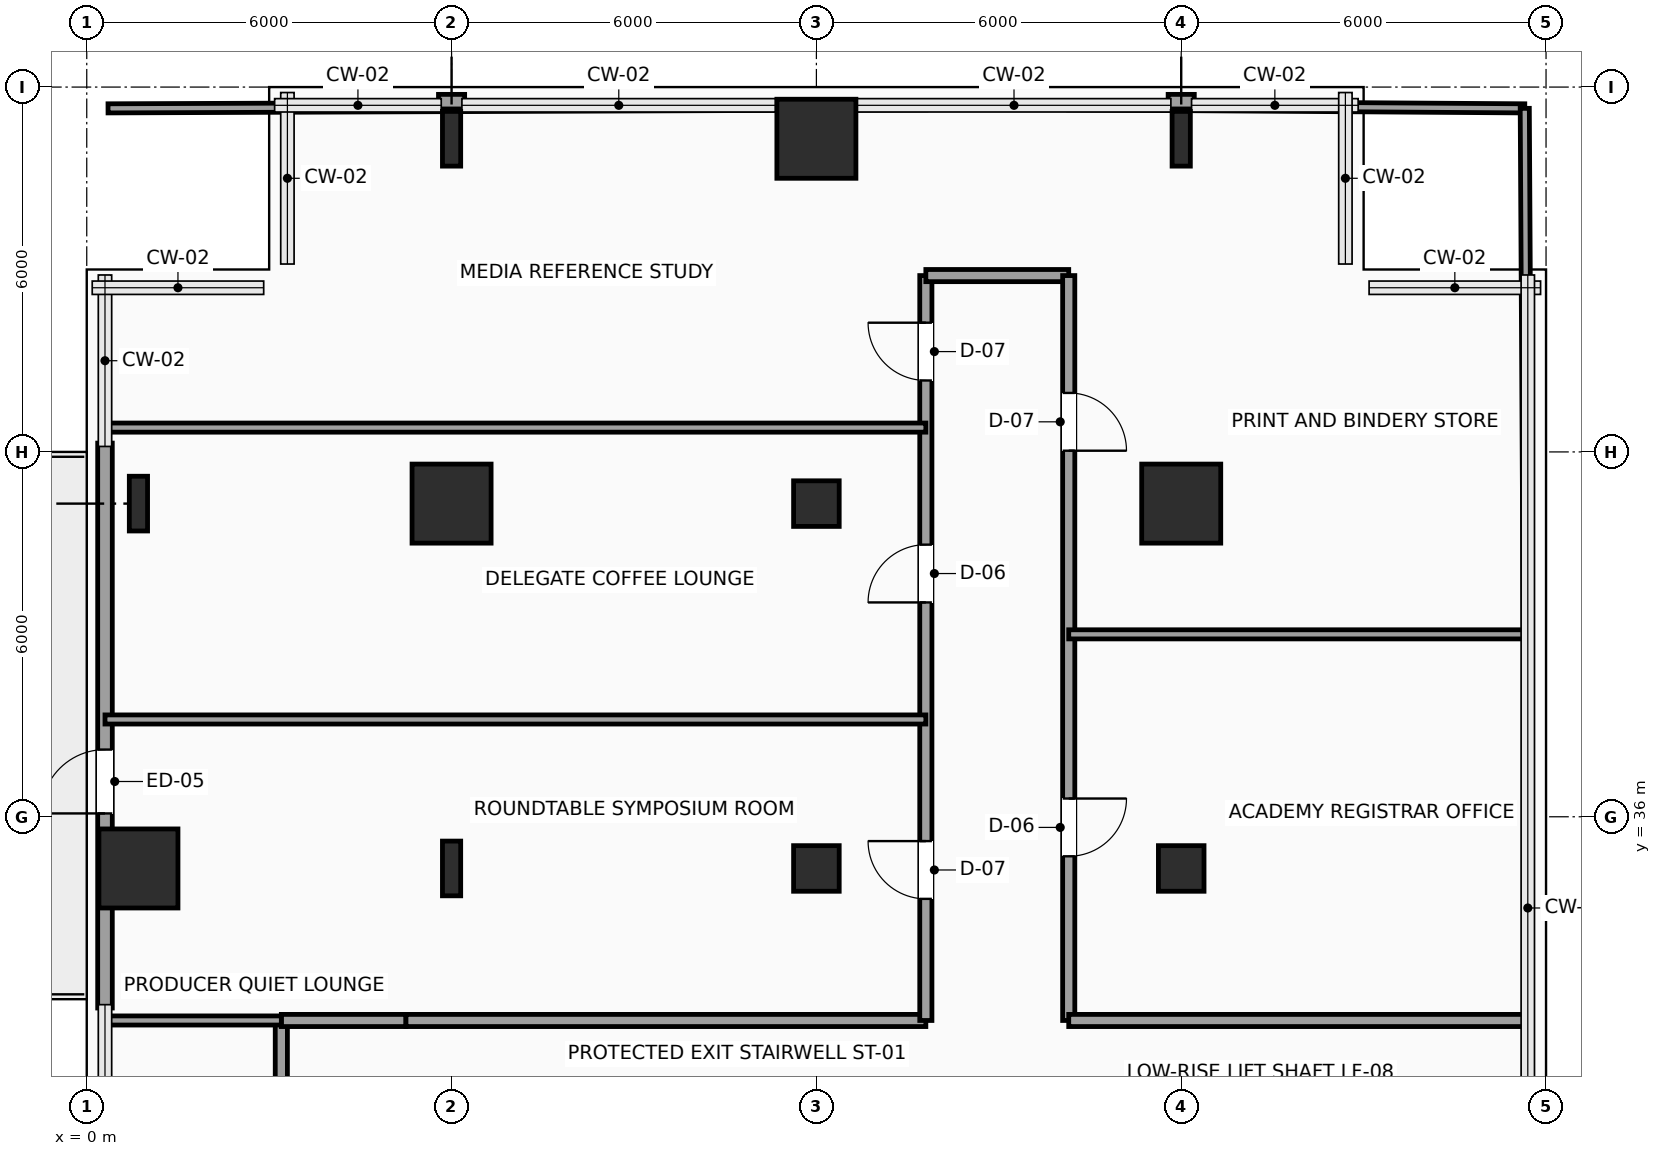
"""IFC4 building model, lengths in metres.
Left out: names, types, materials, properties, quantities, classifications, styles, units other than length and angle.
Written with IfcOpenShell. Run it as: python <this file> out.ifc"""

import sys

from ifc_helpers import new_model, si_unit, direction, frame, frame_2d, origin, origin_2d, place, context, subcontext, project, spatial, rectangle, hollow_rectangle, i_section, extrude, element, fill, save


model = new_model("IFC4")
c1 = context("Model", 3, precision=1e-05, world=origin(), true_north=direction((0.0, 1.0)))
c2 = subcontext(c1, "Body", "Model", "MODEL_VIEW")
j1 = project(units=[si_unit("LENGTHUNIT", "METRE"), si_unit("PLANEANGLEUNIT", "RADIAN")], contexts=[c1])
p1 = place(None, origin())
s1 = spatial("IfcSite", under=j1, at=p1, CompositionType="ELEMENT")
p2 = place(p1, origin())
s2 = spatial("IfcBuilding", under=s1, at=p2, CompositionType="ELEMENT")
p3 = place(p2, frame((0.0, 0.0, 55.8)))
s3 = spatial("IfcBuildingStorey", under=s2, at=p3, CompositionType="ELEMENT", Elevation=55.8)
p4 = place(p3, frame((0.85, 35.15, 0.0), z_axis=(0.0, 0.0, 1.0), x_axis=(1.0, 0.0, 0.0)))
e1 = element("IfcColumn", 1, at=p4, inside=s3, PredefinedType="COLUMN", context=c2, shape_type="SweptSolid", body=[
    extrude(rectangle(XDim=1.3, YDim=1.3, at=origin_2d()), origin(), (0.0, 0.0, 1.0), 3.9),
])
for number, where, z_axis, x_axis in (
    (2, (0.85, 41.15, 0.0), (0.0, 0.0, 1.0), (1.0, 0.0, 0.0)),
    (3, (6.0, 35.15, 0.0), (0.0, 0.0, 1.0), (1.0, 0.0, 0.0)),
):
    element("IfcColumn", number, at=place(p3, frame(where, z_axis=z_axis, x_axis=x_axis)), inside=s3, PredefinedType="COLUMN", context=c2, shape_type="SweptSolid", body=[
        extrude(i_section(OverallWidth=0.3, OverallDepth=0.9, WebThickness=0.019, FlangeThickness=0.035, FilletRadius=0.03, at=origin_2d()), origin(), (0.0, 0.0, 1.0), 3.9),
    ])
p5 = place(p3, frame((6.0, 41.15, 0.0), z_axis=(0.0, 0.0, 1.0), x_axis=(1.0, 0.0, 0.0)))
e4 = element("IfcColumn", 4, at=p5, inside=s3, PredefinedType="COLUMN", context=c2, shape_type="SweptSolid", body=[
    extrude(rectangle(XDim=1.3, YDim=1.3, at=origin_2d()), origin(), (0.0, 0.0, 1.0), 3.9),
])
p6 = place(p3, frame((6.0, 47.15, 0.0), z_axis=(0.0, 0.0, 1.0), x_axis=(1.0, 0.0, 0.0)))
e5 = element("IfcColumn", 5, at=p6, inside=s3, PredefinedType="COLUMN", context=c2, shape_type="SweptSolid", body=[
    extrude(i_section(OverallWidth=0.3, OverallDepth=0.9, WebThickness=0.019, FlangeThickness=0.035, FilletRadius=0.03, at=origin_2d()), origin(), (0.0, 0.0, 1.0), 3.9),
])
for number, where, z_axis, x_axis in (
    (6, (12.0, 35.15, 0.0), (0.0, 0.0, 1.0), (1.0, 0.0, 0.0)),
    (7, (12.0, 41.15, 0.0), (0.0, 0.0, 1.0), (1.0, 0.0, 0.0)),
):
    element("IfcColumn", number, at=place(p3, frame(where, z_axis=z_axis, x_axis=x_axis)), inside=s3, PredefinedType="COLUMN", context=c2, shape_type="SweptSolid", body=[
        extrude(hollow_rectangle(XDim=0.75, YDim=0.75, WallThickness=0.035, InnerFilletRadius=0.035, OuterFilletRadius=0.05, at=origin_2d()), origin(), (0.0, 0.0, 1.0), 3.9),
    ])
p7 = place(p3, frame((12.0, 47.15, 0.0), z_axis=(0.0, 0.0, 1.0), x_axis=(1.0, 0.0, 0.0)))
e8 = element("IfcColumn", 8, at=p7, inside=s3, PredefinedType="COLUMN", context=c2, shape_type="SweptSolid", body=[
    extrude(rectangle(XDim=1.3, YDim=1.3, at=origin_2d()), origin(), (0.0, 0.0, 1.0), 3.9),
])
p8 = place(p3, frame((18.0, 35.15, 0.0), z_axis=(0.0, 0.0, 1.0), x_axis=(1.0, 0.0, 0.0)))
e9 = element("IfcColumn", 9, at=p8, inside=s3, PredefinedType="COLUMN", context=c2, shape_type="SweptSolid", body=[
    extrude(hollow_rectangle(XDim=0.75, YDim=0.75, WallThickness=0.035, InnerFilletRadius=0.035, OuterFilletRadius=0.05, at=origin_2d()), origin(), (0.0, 0.0, 1.0), 3.9),
])
p9 = place(p3, frame((18.0, 41.15, 0.0), z_axis=(0.0, 0.0, 1.0), x_axis=(1.0, 0.0, 0.0)))
e10 = element("IfcColumn", 10, at=p9, inside=s3, PredefinedType="COLUMN", context=c2, shape_type="SweptSolid", body=[
    extrude(rectangle(XDim=1.3, YDim=1.3, at=origin_2d()), origin(), (0.0, 0.0, 1.0), 3.9),
])
p10 = place(p3, frame((18.0, 47.15, 0.0), z_axis=(0.0, 0.0, 1.0), x_axis=(1.0, 0.0, 0.0)))
e11 = element("IfcColumn", 11, at=p10, inside=s3, PredefinedType="COLUMN", context=c2, shape_type="SweptSolid", body=[
    extrude(i_section(OverallWidth=0.3, OverallDepth=0.9, WebThickness=0.019, FlangeThickness=0.035, FilletRadius=0.03, at=origin_2d()), origin(), (0.0, 0.0, 1.0), 3.9),
])
p11 = place(p3, frame((0.3, 32.855, 0.0), z_axis=(0.0, 0.0, 1.0), x_axis=(0.0, 1.0, 0.0)))
e12 = element("IfcWall", 12, at=p11, inside=s3, PredefinedType="SOLIDWALL", context=c2, shape_type="SweptSolid", body=[
    extrude(rectangle(XDim=9.29, YDim=0.24, at=frame_2d((4.645, 0.0))), origin(), (0.0, 0.0, 1.0), 3.65),
])
p12 = place(p11, frame((3.2, 0.0, 0.0)))
e13 = element("IfcOpeningElement", 13, at=p12, cuts=e12, PredefinedType="OPENING", context=c2, shape_type="SweptSolid", body=[
    extrude(rectangle(XDim=1.05, YDim=2.2, at=frame_2d((0.525, 1.1))), frame((0.0, 0.13, 0.0), z_axis=(0.0, -1.0, 0.0), x_axis=(1.0, 0.0, 0.0)), (0.0, 0.0, 1.0), 0.26),
])
for number, where, z_axis, x_axis in (
    (14, (5.785, 47.76, 0.0), (0.0, 0.0, 1.0), (1.0, 0.0, 0.0)),
    (15, (17.785, 47.76, 0.0), (0.0, 0.0, 1.0), (1.0, 0.0, 0.0)),
):
    element("IfcWall", number, at=place(p3, frame(where, z_axis=z_axis, x_axis=x_axis)), inside=s3, PredefinedType="SOLIDWALL", context=c2, shape_type="SweptSolid", body=[
        extrude(rectangle(XDim=0.43, YDim=0.24, at=frame_2d((0.215, 0.0))), origin(), (0.0, 0.0, 1.0), 3.65),
    ])
p13 = place(p3, frame((3.2, 30.25, 0.0), z_axis=(0.0, 0.0, 1.0), x_axis=(0.0, 1.0, 0.0)))
e16 = element("IfcWall", 16, at=p13, inside=s3, PredefinedType="SOLIDWALL", context=c2, shape_type="SweptSolid", body=[
    extrude(rectangle(XDim=2.4, YDim=0.2, at=frame_2d((1.2, 0.0))), origin(), (0.0, 0.0, 1.0), 3.65),
])
p14 = place(p3, frame((3.2, 32.65, 0.0), z_axis=(0.0, 0.0, 1.0), x_axis=(1.0, 0.0, 0.0)))
e17 = element("IfcWall", 17, at=p14, inside=s3, PredefinedType="SOLIDWALL", context=c2, shape_type="SweptSolid", body=[
    extrude(rectangle(XDim=2.05, YDim=0.2, at=frame_2d((1.025, 0.0))), origin(), (0.0, 0.0, 1.0), 3.65),
])
p15 = place(p3, frame((5.25, 32.65, 0.0), z_axis=(0.0, 0.0, 1.0), x_axis=(1.0, 0.0, 0.0)))
e18 = element("IfcWall", 18, at=p15, inside=s3, PredefinedType="SOLIDWALL", context=c2, shape_type="SweptSolid", body=[
    extrude(rectangle(XDim=8.55, YDim=0.2, at=frame_2d((4.275, 0.0))), origin(), (0.0, 0.0, 1.0), 3.65),
])
p16 = place(p3, frame((13.8, 32.65, 0.0), z_axis=(0.0, 0.0, 1.0), x_axis=(0.0, 1.0, 0.0)))
e19 = element("IfcWall", 19, at=p16, inside=s3, PredefinedType="SOLIDWALL", context=c2, shape_type="SweptSolid", body=[
    extrude(rectangle(XDim=12.25, YDim=0.2, at=frame_2d((6.125, 0.0))), origin(), (0.0, 0.0, 1.0), 3.65),
])
p17 = place(p16, frame((2.0, 0.0, 0.0)))
e20 = element("IfcOpeningElement", 20, at=p17, cuts=e19, PredefinedType="OPENING", context=c2, shape_type="SweptSolid", body=[
    extrude(rectangle(XDim=0.95, YDim=2.15, at=frame_2d((0.475, 1.075))), frame((0.0, 0.11, 0.0), z_axis=(0.0, -1.0, 0.0), x_axis=(1.0, 0.0, 0.0)), (0.0, 0.0, 1.0), 0.22),
])
p18 = place(p16, frame((6.875, 0.0, 0.0)))
e21 = element("IfcOpeningElement", 21, at=p18, cuts=e19, PredefinedType="OPENING", context=c2, shape_type="SweptSolid", body=[
    extrude(rectangle(XDim=0.95, YDim=2.15, at=frame_2d((0.475, 1.075))), frame((0.0, 0.11, 0.0), z_axis=(0.0, -1.0, 0.0), x_axis=(1.0, 0.0, 0.0)), (0.0, 0.0, 1.0), 0.22),
])
p19 = place(p16, frame((10.525, 0.0, 0.0)))
e22 = element("IfcOpeningElement", 22, at=p19, cuts=e19, PredefinedType="OPENING", context=c2, shape_type="SweptSolid", body=[
    extrude(rectangle(XDim=0.95, YDim=2.15, at=frame_2d((0.475, 1.075))), frame((0.0, 0.11, 0.0), z_axis=(0.0, -1.0, 0.0), x_axis=(1.0, 0.0, 0.0)), (0.0, 0.0, 1.0), 0.22),
])
p20 = place(p3, frame((13.8, 44.9, 0.0), z_axis=(0.0, 0.0, 1.0), x_axis=(1.0, 0.0, 0.0)))
e23 = element("IfcWall", 23, at=p20, inside=s3, PredefinedType="SOLIDWALL", context=c2, shape_type="SweptSolid", body=[
    extrude(rectangle(XDim=2.35, YDim=0.2, at=frame_2d((1.175, 0.0))), origin(), (0.0, 0.0, 1.0), 3.65),
])
p21 = place(p3, frame((16.15, 44.9, 0.0), z_axis=(0.0, 0.0, 1.0), x_axis=(0.0, -1.0, 0.0)))
e24 = element("IfcWall", 24, at=p21, inside=s3, PredefinedType="SOLIDWALL", context=c2, shape_type="SweptSolid", body=[
    extrude(rectangle(XDim=12.25, YDim=0.2, at=frame_2d((6.125, 0.0))), origin(), (0.0, 0.0, 1.0), 3.65),
])
p22 = place(p21, frame((8.6, 0.0, 0.0)))
e25 = element("IfcOpeningElement", 25, at=p22, cuts=e24, PredefinedType="OPENING", context=c2, shape_type="SweptSolid", body=[
    extrude(rectangle(XDim=0.95, YDim=2.15, at=frame_2d((0.475, 1.075))), frame((0.0, 0.11, 0.0), z_axis=(0.0, -1.0, 0.0), x_axis=(1.0, 0.0, 0.0)), (0.0, 0.0, 1.0), 0.22),
])
p23 = place(p21, frame((1.93, 0.0, 0.0)))
e26 = element("IfcOpeningElement", 26, at=p23, cuts=e24, PredefinedType="OPENING", context=c2, shape_type="SweptSolid", body=[
    extrude(rectangle(XDim=0.95, YDim=2.15, at=frame_2d((0.475, 1.075))), frame((0.0, 0.11, 0.0), z_axis=(0.0, -1.0, 0.0), x_axis=(1.0, 0.0, 0.0)), (0.0, 0.0, 1.0), 0.22),
])
p24 = place(p3, frame((16.15, 32.65, 0.0), z_axis=(0.0, 0.0, 1.0), x_axis=(1.0, 0.0, 0.0)))
e27 = element("IfcWall", 27, at=p24, inside=s3, PredefinedType="SOLIDWALL", context=c2, shape_type="SweptSolid", body=[
    extrude(rectangle(XDim=7.55, YDim=0.2, at=frame_2d((3.775, 0.0))), origin(), (0.0, 0.0, 1.0), 3.65),
])
for number, where, z_axis, x_axis in (
    (28, (0.3, 37.6, 0.0), (0.0, 0.0, 1.0), (1.0, 0.0, 0.0)),
    (29, (0.3, 42.4, 0.0), (0.0, 0.0, 1.0), (1.0, 0.0, 0.0)),
):
    element("IfcWall", number, at=place(p3, frame(where, z_axis=z_axis, x_axis=x_axis)), inside=s3, PredefinedType="PARTITIONING", context=c2, shape_type="SweptSolid", body=[
        extrude(rectangle(XDim=13.5, YDim=0.15, at=frame_2d((6.75, 0.0))), origin(), (0.0, 0.0, 1.0), 3.65),
    ])
p25 = place(p3, frame((0.35, 47.65, 0.0), z_axis=(0.0, 0.0, 1.0), x_axis=(0.99999304924, 0.003728467862, 0.0)))
e30 = element("IfcWall", 30, at=p25, inside=s3, PredefinedType="PARTITIONING", context=c2, shape_type="SweptSolid", body=[
    extrude(rectangle(XDim=5.435, YDim=0.15, at=frame_2d((2.717, 0.0))), origin(), (0.0, 0.0, 1.0), 3.65),
])
p26 = place(p3, frame((6.215, 47.672, 0.0), z_axis=(0.0, 0.0, 1.0), x_axis=(0.999993149305, 0.003701532515, 0.0)))
e31 = element("IfcWall", 31, at=p26, inside=s3, PredefinedType="PARTITIONING", context=c2, shape_type="SweptSolid", body=[
    extrude(rectangle(XDim=7.585, YDim=0.15, at=frame_2d((3.792, 0.0))), origin(), (0.0, 0.0, 1.0), 3.65),
])
p27 = place(p3, frame((16.15, 39.0, 0.0), z_axis=(0.0, 0.0, 1.0), x_axis=(1.0, 0.0, 0.0)))
e32 = element("IfcWall", 32, at=p27, inside=s3, PredefinedType="PARTITIONING", context=c2, shape_type="SweptSolid", body=[
    extrude(rectangle(XDim=7.55, YDim=0.15, at=frame_2d((3.775, 0.0))), origin(), (0.0, 0.0, 1.0), 3.65),
])
p28 = place(p3, frame((16.15, 47.7, 0.0), z_axis=(0.0, 0.0, 1.0), x_axis=(0.999978417552, -0.006569964219, 0.0)))
e33 = element("IfcWall", 33, at=p28, inside=s3, PredefinedType="PARTITIONING", context=c2, shape_type="SweptSolid", body=[
    extrude(rectangle(XDim=1.635, YDim=0.15, at=frame_2d((0.817, 0.0))), origin(), (0.0, 0.0, 1.0), 3.65),
])
p29 = place(p3, frame((18.215, 47.686, 0.0), z_axis=(0.0, 0.0, 1.0), x_axis=(0.999977600485, -0.006693170229, 0.0)))
e34 = element("IfcWall", 34, at=p29, inside=s3, PredefinedType="PARTITIONING", context=c2, shape_type="SweptSolid", body=[
    extrude(rectangle(XDim=5.435, YDim=0.15, at=frame_2d((2.717, 0.0))), origin(), (0.0, 0.0, 1.0), 3.65),
])
p30 = place(p3, frame((23.7, 39.0, 0.0), z_axis=(0.0, 0.0, 1.0), x_axis=(-0.005785960162, 0.999983261192, 0.0)))
e35 = element("IfcWall", 35, at=p30, inside=s3, PredefinedType="PARTITIONING", context=c2, shape_type="SweptSolid", body=[
    extrude(rectangle(XDim=8.65, YDim=0.15, at=frame_2d((4.325, 0.0))), origin(), (0.0, 0.0, 1.0), 3.65),
])
p31 = place(p3, frame((0.3, 32.65, 0.0), z_axis=(0.0, 0.0, 1.0), x_axis=(1.0, 0.0, 0.0)))
e36 = element("IfcWall", 36, at=p31, inside=s3, PredefinedType="PARTITIONING", context=c2, shape_type="SweptSolid", body=[
    extrude(rectangle(XDim=2.9, YDim=0.15, at=frame_2d((1.45, 0.0))), origin(), (0.0, 0.0, 1.0), 3.65),
])
p32 = place(p12, origin())
e37 = element("IfcDoor", 37, at=p32, inside=s3, OperationType="SINGLE_SWING_LEFT", PredefinedType="DOOR", context=c2, shape_type="SweptSolid", body=[
    extrude(rectangle(XDim=1.05, YDim=2.2, at=frame_2d((0.525, 1.1))), frame((0.0, 0.025, 0.0), z_axis=(0.0, -1.0, 0.0), x_axis=(1.0, 0.0, 0.0)), (0.0, 0.0, 1.0), 0.05),
])
fill(e13, e37)
p33 = place(p17, origin())
e38 = element("IfcDoor", 38, at=p33, inside=s3, OperationType="SINGLE_SWING_RIGHT", PredefinedType="DOOR", context=c2, shape_type="SweptSolid", body=[
    extrude(rectangle(XDim=0.95, YDim=2.15, at=frame_2d((0.475, 1.075))), frame((0.0, 0.025, 0.0), z_axis=(0.0, -1.0, 0.0), x_axis=(1.0, 0.0, 0.0)), (0.0, 0.0, 1.0), 0.05),
])
fill(e20, e38)
p34 = place(p18, origin())
e39 = element("IfcDoor", 39, at=p34, inside=s3, OperationType="SINGLE_SWING_LEFT", PredefinedType="DOOR", context=c2, shape_type="SweptSolid", body=[
    extrude(rectangle(XDim=0.95, YDim=2.15, at=frame_2d((0.475, 1.075))), frame((0.0, 0.025, 0.0), z_axis=(0.0, -1.0, 0.0), x_axis=(1.0, 0.0, 0.0)), (0.0, 0.0, 1.0), 0.05),
])
fill(e21, e39)
p35 = place(p19, origin())
e40 = element("IfcDoor", 40, at=p35, inside=s3, OperationType="SINGLE_SWING_RIGHT", PredefinedType="DOOR", context=c2, shape_type="SweptSolid", body=[
    extrude(rectangle(XDim=0.95, YDim=2.15, at=frame_2d((0.475, 1.075))), frame((0.0, 0.025, 0.0), z_axis=(0.0, -1.0, 0.0), x_axis=(1.0, 0.0, 0.0)), (0.0, 0.0, 1.0), 0.05),
])
fill(e22, e40)
p36 = place(p22, origin())
e41 = element("IfcDoor", 41, at=p36, inside=s3, OperationType="SINGLE_SWING_LEFT", PredefinedType="DOOR", context=c2, shape_type="SweptSolid", body=[
    extrude(rectangle(XDim=0.95, YDim=2.15, at=frame_2d((0.475, 1.075))), frame((0.0, 0.025, 0.0), z_axis=(0.0, -1.0, 0.0), x_axis=(1.0, 0.0, 0.0)), (0.0, 0.0, 1.0), 0.05),
])
fill(e25, e41)
p37 = place(p23, origin())
e42 = element("IfcDoor", 42, at=p37, inside=s3, OperationType="SINGLE_SWING_RIGHT", PredefinedType="DOOR", context=c2, shape_type="SweptSolid", body=[
    extrude(rectangle(XDim=0.95, YDim=2.15, at=frame_2d((0.475, 1.075))), frame((0.0, 0.025, 0.0), z_axis=(0.0, -1.0, 0.0), x_axis=(1.0, 0.0, 0.0)), (0.0, 0.0, 1.0), 0.05),
])
fill(e26, e42)
save(model, sys.argv[1])
